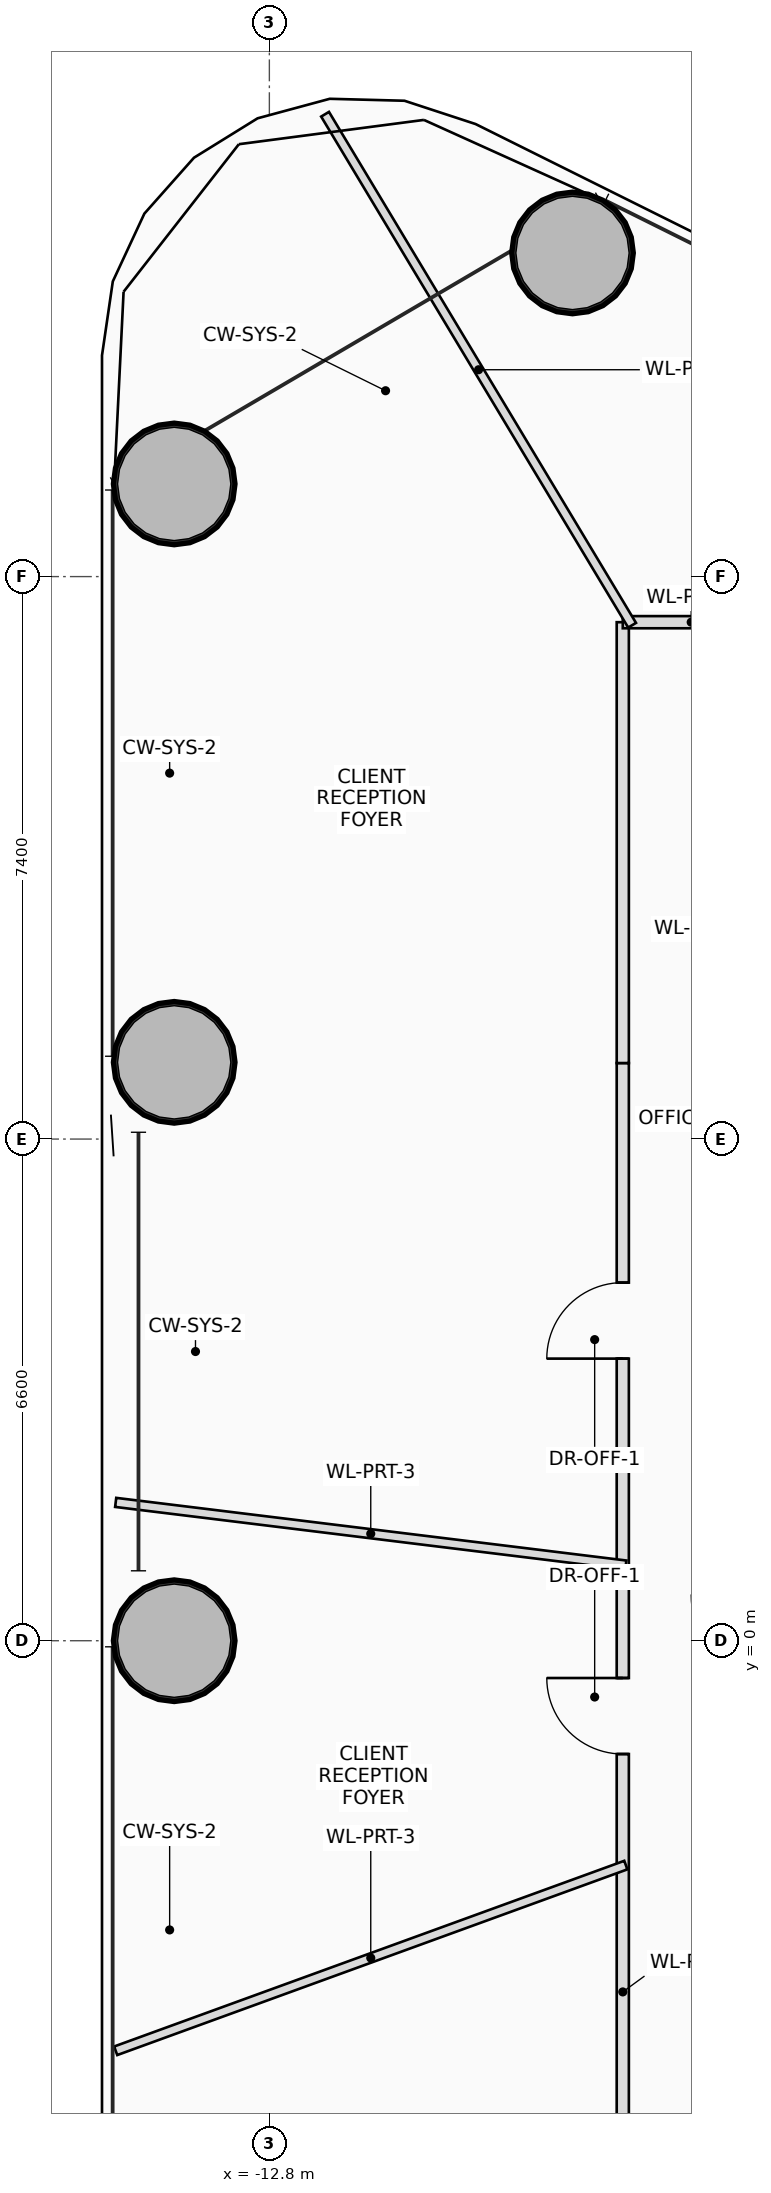
"""IFC4 building model, lengths in metres.
Left out: names, types, materials, properties, quantities, classifications, styles, units other than length and angle.
Written with IfcOpenShell. Run it as: python <this file> out.ifc"""

import sys

from ifc_helpers import new_model, si_unit, direction, frame, frame_2d, origin, origin_2d, place, context, subcontext, project, spatial, rectangle, hollow_circle, extrude, source, transform, mapped, element, fill, save


model = new_model("IFC4")
c1 = context("Model", 3, precision=1e-05, world=origin(), true_north=direction((0.0, 1.0)))
c2 = subcontext(c1, "Body", "Model", "MODEL_VIEW")
j1 = project(units=[si_unit("LENGTHUNIT", "METRE"), si_unit("PLANEANGLEUNIT", "RADIAN")], contexts=[c1])
p1 = place(None, origin())
s1 = spatial("IfcSite", under=j1, at=p1, CompositionType="ELEMENT")
p2 = place(p1, origin())
s2 = spatial("IfcBuilding", under=s1, at=p2, CompositionType="ELEMENT")
p3 = place(p2, frame((0.0, 0.0, 42.3)))
s3 = spatial("IfcBuildingStorey", under=s2, at=p3, CompositionType="ELEMENT", Elevation=42.3)
m1 = source(origin(), c2, "Body", "SweptSolid", [
    extrude(hollow_circle(Radius=0.8, WallThickness=0.055, at=origin_2d()), origin(), (0.0, 0.0, 1.0), 3.7),
])
for number, where, z_axis, x_axis in (
    (1, (-8.812, 18.258, 0.0), (0.0, 0.0, 1.0), (1.0, 0.0, 0.0)),
    (2, (-14.052, 15.219, 0.0), (0.0, 0.0, 1.0), (1.0, 0.0, 0.0)),
    (3, (-14.052, 7.61, 0.0), (0.0, 0.0, 1.0), (1.0, 0.0, 0.0)),
    (4, (-14.052, 0.0, 0.0), (0.0, 0.0, 1.0), (1.0, 0.0, 0.0)),
):
    element("IfcColumn", number, at=place(p3, frame(where, z_axis=z_axis, x_axis=x_axis)), inside=s3, PredefinedType="COLUMN", context=c2, shape_type="MappedRepresentation", body=[
        mapped(m1, transform((0.0, 0.0, 0.0), scale=1.0)),
    ])
p4 = place(p3, frame((-8.15, -7.6, 0.0), z_axis=(0.0, 0.0, 1.0), x_axis=(0.0, 1.0, 0.0)))
e5 = element("IfcWall", 5, at=p4, inside=s3, PredefinedType="PARTITIONING", context=c2, shape_type="SweptSolid", body=[
    extrude(rectangle(XDim=15.2, YDim=0.16, at=frame_2d((7.6, 0.0))), origin(), (0.0, 0.0, 1.0), 2.8),
])
p5 = place(p4, frame((6.109, 0.0, 0.0)))
e6 = element("IfcOpeningElement", 6, at=p5, cuts=e5, PredefinedType="OPENING", context=c2, shape_type="SweptSolid", body=[
    extrude(rectangle(XDim=1.0, YDim=2.25, at=frame_2d((0.5, 1.125))), frame((0.0, 0.09, 0.0), z_axis=(0.0, -1.0, 0.0), x_axis=(1.0, 0.0, 0.0)), (0.0, 0.0, 1.0), 0.18),
])
p6 = place(p4, frame((11.312, 0.0, 0.0)))
e7 = element("IfcOpeningElement", 7, at=p6, cuts=e5, PredefinedType="OPENING", context=c2, shape_type="SweptSolid", body=[
    extrude(rectangle(XDim=1.0, YDim=2.25, at=frame_2d((0.5, 1.125))), frame((0.0, 0.09, 0.0), z_axis=(0.0, -1.0, 0.0), x_axis=(1.0, 0.0, 0.0)), (0.0, 0.0, 1.0), 0.18),
])
p7 = place(p3, frame((-8.15, 7.6, 0.0), z_axis=(0.0, 0.0, 1.0), x_axis=(0.0, 1.0, 0.0)))
e8 = element("IfcWall", 8, at=p7, inside=s3, PredefinedType="PARTITIONING", context=c2, shape_type="SweptSolid", body=[
    extrude(rectangle(XDim=5.8, YDim=0.16, at=frame_2d((2.9, 0.0))), origin(), (0.0, 0.0, 1.0), 2.8),
])
p8 = place(p3, frame((-8.15, 13.4, 0.0), z_axis=(0.0, 0.0, 1.0), x_axis=(1.0, 0.0, 0.0)))
e9 = element("IfcWall", 9, at=p8, inside=s3, PredefinedType="PARTITIONING", context=c2, shape_type="SweptSolid", body=[
    extrude(rectangle(XDim=1.8, YDim=0.16, at=frame_2d((0.9, 0.0))), origin(), (0.0, 0.0, 1.0), 2.8),
])
p9 = place(p3, frame((-8.028, 13.36, 0.0), z_axis=(0.0, 0.0, 1.0), x_axis=(-0.515031259007, 0.857171396073, 0.0)))
e10 = element("IfcWall", 10, at=p9, inside=s3, PredefinedType="PARTITIONING", context=c2, shape_type="SweptSolid", body=[
    extrude(rectangle(XDim=7.843, YDim=0.12, at=frame_2d((3.921, 0.0))), origin(), (0.0, 0.0, 1.0), 2.96),
])
p10 = place(p3, frame((-8.11, 0.996, 0.0), z_axis=(0.0, 0.0, 1.0), x_axis=(-0.992548741741, 0.121848246885, 0.0)))
e11 = element("IfcWall", 11, at=p10, inside=s3, PredefinedType="PARTITIONING", context=c2, shape_type="SweptSolid", body=[
    extrude(rectangle(XDim=6.762, YDim=0.12, at=frame_2d((3.381, 0.0))), origin(), (0.0, 0.0, 1.0), 2.96),
])
p11 = place(p3, frame((-8.11, -2.952, 0.0), z_axis=(0.0, 0.0, 1.0), x_axis=(-0.939695583315, -0.342012003734, 0.0)))
e12 = element("IfcWall", 12, at=p11, inside=s3, PredefinedType="PARTITIONING", context=c2, shape_type="SweptSolid", body=[
    extrude(rectangle(XDim=7.143, YDim=0.12, at=frame_2d((3.571, 0.0))), origin(), (0.0, 0.0, 1.0), 2.8),
])
p12 = place(p5, origin())
e13 = element("IfcDoor", 13, at=p12, inside=s3, OperationType="SINGLE_SWING_RIGHT", PredefinedType="DOOR", context=c2, shape_type="SweptSolid", body=[
    extrude(rectangle(XDim=1.0, YDim=2.25, at=frame_2d((0.5, 1.125))), frame((0.0, 0.025, 0.0), z_axis=(0.0, -1.0, 0.0), x_axis=(1.0, 0.0, 0.0)), (0.0, 0.0, 1.0), 0.05),
])
fill(e6, e13)
p13 = place(p6, origin())
e14 = element("IfcDoor", 14, at=p13, inside=s3, OperationType="SINGLE_SWING_LEFT", PredefinedType="DOOR", context=c2, shape_type="SweptSolid", body=[
    extrude(rectangle(XDim=1.0, YDim=2.25, at=frame_2d((0.5, 1.125))), frame((0.0, 0.025, 0.0), z_axis=(0.0, -1.0, 0.0), x_axis=(1.0, 0.0, 0.0)), (0.0, 0.0, 1.0), 0.05),
])
fill(e7, e14)
save(model, sys.argv[1])
